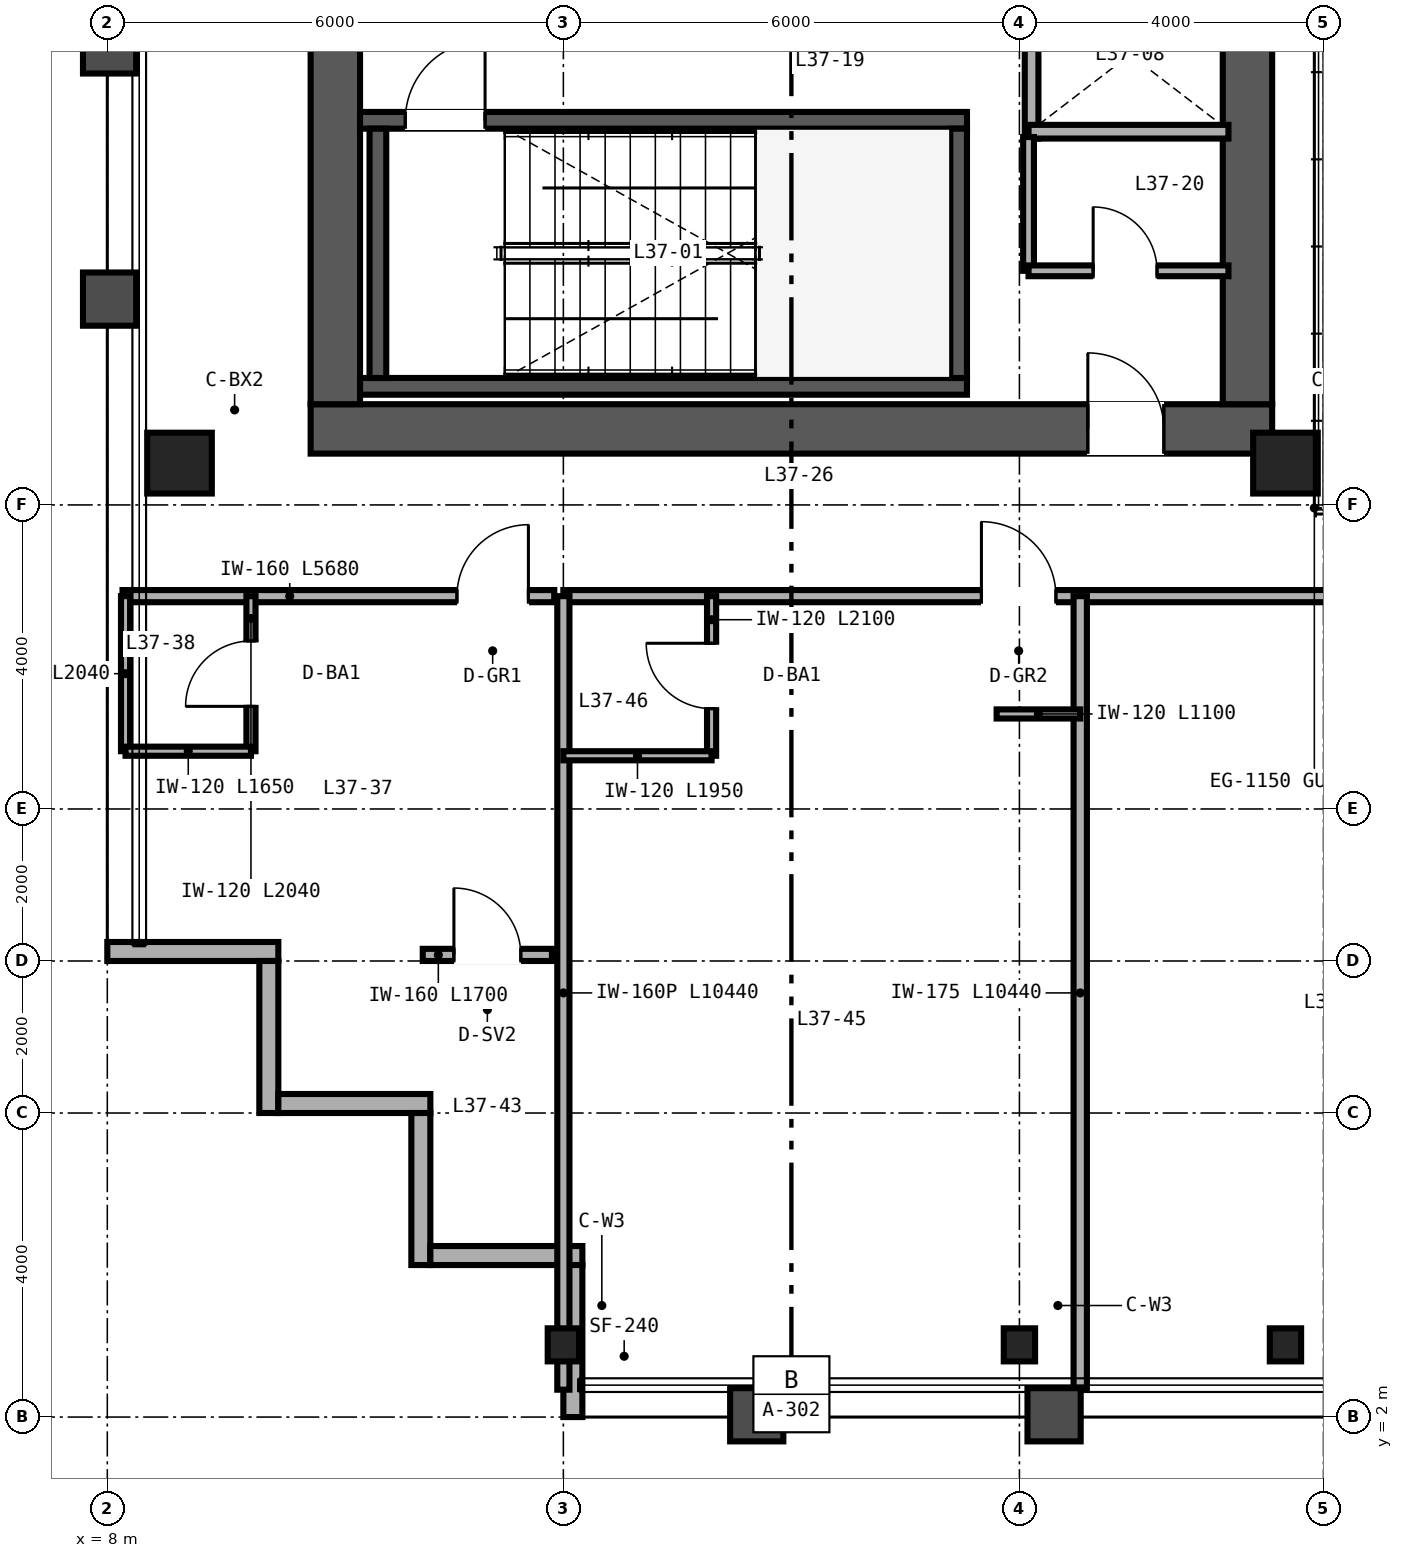
"""IFC4 building model, lengths in metres.
Left out: names, types, materials, properties, quantities, classifications, styles, units other than length and angle.
Written with IfcOpenShell. Run it as: python <this file> out.ifc"""

import sys

from ifc_helpers import new_model, si_unit, direction, frame, frame_2d, origin, origin_2d, place, context, subcontext, project, spatial, rectangle, hollow_rectangle, i_section, extrude, source, transform, mapped, element, fill, save


model = new_model("IFC4")
c1 = context("Model", 3, precision=1e-05, world=origin(), true_north=direction((0.0, 1.0)))
c2 = subcontext(c1, "Body", "Model", "MODEL_VIEW")
j1 = project(units=[si_unit("LENGTHUNIT", "METRE"), si_unit("PLANEANGLEUNIT", "RADIAN")], contexts=[c1])
p1 = place(None, origin())
s1 = spatial("IfcSite", under=j1, at=p1, CompositionType="ELEMENT")
p2 = place(p1, origin())
s2 = spatial("IfcBuilding", under=s1, at=p2, CompositionType="ELEMENT")
p3 = place(p2, frame((0.0, 0.0, 147.6)))
s3 = spatial("IfcBuildingStorey", under=s2, at=p3, CompositionType="ELEMENT", Elevation=147.6)
p4 = place(p3, frame((10.675, 15.0, 0.0), z_axis=(0.0, 0.0, 1.0), x_axis=(1.0, 0.0, 0.0)))
e1 = element("IfcWall", 1, at=p4, inside=s3, PredefinedType="SHEAR", context=c2, shape_type="SweptSolid", body=[
    extrude(rectangle(XDim=12.65, YDim=0.65, at=frame_2d((6.325, 0.0))), origin(), (0.0, 0.0, 1.0), 3.28),
])
p5 = place(p4, frame((10.225, 0.0, 0.0)))
e2 = element("IfcOpeningElement", 2, at=p5, cuts=e1, PredefinedType="OPENING", context=c2, shape_type="SweptSolid", body=[
    extrude(rectangle(XDim=1.0, YDim=2.15, at=frame_2d((0.5, 1.075))), frame((0.0, 0.335, 0.0), z_axis=(0.0, -1.0, 0.0), x_axis=(1.0, 0.0, 0.0)), (0.0, 0.0, 1.0), 0.67),
])
for number, where, z_axis, x_axis in (
    (3, (11.0, 15.325, 0.0), (0.0, 0.0, 1.0), (0.0, 1.0, 0.0)),
    (4, (23.0, 15.325, 0.0), (0.0, 0.0, 1.0), (0.0, 1.0, 0.0)),
):
    element("IfcWall", number, at=place(p3, frame(where, z_axis=z_axis, x_axis=x_axis)), inside=s3, PredefinedType="SHEAR", context=c2, shape_type="SweptSolid", body=[
        extrude(rectangle(XDim=21.35, YDim=0.65, at=frame_2d((10.675, 0.0))), origin(), (0.0, 0.0, 1.0), 3.28),
    ])
p6 = place(p3, frame((11.325, 15.56, 0.0), z_axis=(0.0, 0.0, 1.0), x_axis=(1.0, 0.0, 0.0)))
e5 = element("IfcWall", 5, at=p6, inside=s3, PredefinedType="SHEAR", context=c2, shape_type="SweptSolid", body=[
    extrude(rectangle(XDim=7.985, YDim=0.22, at=frame_2d((3.993, 0.0))), origin(), (0.0, 0.0, 1.0), 3.4),
])
p7 = place(p3, frame((11.325, 19.06, 0.0), z_axis=(0.0, 0.0, 1.0), x_axis=(1.0, 0.0, 0.0)))
e6 = element("IfcWall", 6, at=p7, inside=s3, PredefinedType="SHEAR", context=c2, shape_type="SweptSolid", body=[
    extrude(rectangle(XDim=7.985, YDim=0.22, at=frame_2d((3.993, 0.0))), origin(), (0.0, 0.0, 1.0), 3.4),
])
p8 = place(p7, frame((0.595, 0.0, 0.0)))
e7 = element("IfcOpeningElement", 7, at=p8, cuts=e6, PredefinedType="OPENING", context=c2, shape_type="SweptSolid", body=[
    extrude(rectangle(XDim=1.05, YDim=2.15, at=frame_2d((0.525, 1.075))), frame((0.0, 0.12, 0.0), z_axis=(0.0, -1.0, 0.0), x_axis=(1.0, 0.0, 0.0)), (0.0, 0.0, 1.0), 0.24),
])
for number, where, z_axis, x_axis in (
    (8, (11.56, 15.67, 0.0), (0.0, 0.0, 1.0), (0.0, 1.0, 0.0)),
    (9, (19.2, 15.67, 0.0), (0.0, 0.0, 1.0), (0.0, 1.0, 0.0)),
):
    element("IfcWall", number, at=place(p3, frame(where, z_axis=z_axis, x_axis=x_axis)), inside=s3, PredefinedType="SHEAR", context=c2, shape_type="SweptSolid", body=[
        extrude(rectangle(XDim=3.28, YDim=0.22, at=frame_2d((1.64, 0.0))), origin(), (0.0, 0.0, 1.0), 3.4),
    ])
m1 = source(origin(), c2, "Body", "SweptSolid", [
    extrude(hollow_rectangle(XDim=0.85, YDim=0.8, WallThickness=0.032, at=origin_2d()), origin(), (0.0, 0.0, 1.0), 3.28),
])
for number, where, z_axis, x_axis in (
    (10, (8.95, 14.55, 0.0), (0.0, 0.0, 1.0), (1.0, 0.0, 0.0)),
    (11, (23.5, 14.55, 0.0), (0.0, 0.0, 1.0), (1.0, 0.0, 0.0)),
):
    element("IfcColumn", number, at=place(p3, frame(where, z_axis=z_axis, x_axis=x_axis)), inside=s3, PredefinedType="COLUMN", context=c2, shape_type="MappedRepresentation", body=[
        mapped(m1, transform((0.0, 0.0, 0.0), scale=1.0)),
    ])
m2 = source(origin(), c2, "Body", "SweptSolid", [
    extrude(i_section(OverallWidth=0.412, OverallDepth=0.435, WebThickness=0.036, FlangeThickness=0.057, FilletRadius=0.025, at=origin_2d()), origin(), (0.0, 0.0, 1.0), 3.28),
])
for number, where, z_axis, x_axis in (
    (12, (14.0, 2.95, 0.0), (0.0, 0.0, 1.0), (1.0, 0.0, 0.0)),
    (13, (20.0, 2.95, 0.0), (0.0, 0.0, 1.0), (1.0, 0.0, 0.0)),
    (14, (23.5, 2.95, 0.0), (0.0, 0.0, 1.0), (1.0, 0.0, 0.0)),
):
    element("IfcColumn", number, at=place(p3, frame(where, z_axis=z_axis, x_axis=x_axis)), inside=s3, PredefinedType="COLUMN", context=c2, shape_type="MappedRepresentation", body=[
        mapped(m2, transform((0.0, 0.0, 0.0), scale=1.0)),
    ])
p9 = place(p3, frame((8.0, 8.125, 0.0), z_axis=(0.0, 0.0, 1.0), x_axis=(1.0, 0.0, 0.0)))
e15 = element("IfcWall", 15, at=p9, inside=s3, PredefinedType="SOLIDWALL", context=c2, shape_type="SweptSolid", body=[
    extrude(rectangle(XDim=2.25, YDim=0.25, at=frame_2d((1.125, 0.0))), origin(), (0.0, 0.0, 1.0), 3.28),
])
for number, where, z_axis, x_axis in (
    (16, (10.125, 8.0, 0.0), (0.0, 0.0, 1.0), (0.0, -1.0, 0.0)),
    (17, (10.25, 6.125, 0.0), (0.0, 0.0, 1.0), (1.0, 0.0, 0.0)),
    (18, (12.125, 6.0, 0.0), (0.0, 0.0, 1.0), (0.0, -1.0, 0.0)),
    (19, (12.25, 4.125, 0.0), (0.0, 0.0, 1.0), (1.0, 0.0, 0.0)),
):
    element("IfcWall", number, at=place(p3, frame(where, z_axis=z_axis, x_axis=x_axis)), inside=s3, PredefinedType="SOLIDWALL", context=c2, shape_type="SweptSolid", body=[
        extrude(rectangle(XDim=2.0, YDim=0.25, at=frame_2d((1.0, 0.0))), origin(), (0.0, 0.0, 1.0), 3.28),
    ])
p10 = place(p3, frame((14.125, 4.0, 0.0), z_axis=(0.0, 0.0, 1.0), x_axis=(0.0, -1.0, 0.0)))
e20 = element("IfcWall", 20, at=p10, inside=s3, PredefinedType="SOLIDWALL", context=c2, shape_type="SweptSolid", body=[
    extrude(rectangle(XDim=2.0, YDim=0.25, at=frame_2d((1.0, 0.0))), origin(), (0.0, 0.0, 1.0), 2.587),
])
p11 = place(p3, frame((20.16, 18.82, 0.0), z_axis=(0.0, 0.0, 1.0), x_axis=(0.0, 1.0, 0.0)))
e21 = element("IfcWall", 21, at=p11, inside=s3, PredefinedType="SOLIDWALL", context=c2, shape_type="SweptSolid", body=[
    extrude(rectangle(XDim=6.32, YDim=0.18, at=frame_2d((3.16, 0.0))), origin(), (0.0, 0.0, 1.0), 2.36),
])
p12 = place(p3, frame((20.12, 18.91, 0.0), z_axis=(0.0, 0.0, 1.0), x_axis=(1.0, 0.0, 0.0)))
e22 = element("IfcWall", 22, at=p12, inside=s3, PredefinedType="SOLIDWALL", context=c2, shape_type="SweptSolid", body=[
    extrude(rectangle(XDim=2.63, YDim=0.18, at=frame_2d((1.315, 0.0))), origin(), (0.0, 0.0, 1.0), 3.28),
])
p13 = place(p3, frame((20.12, 17.08, 0.0), z_axis=(0.0, 0.0, 1.0), x_axis=(0.0, 1.0, 0.0)))
e23 = element("IfcWall", 23, at=p13, inside=s3, PredefinedType="PARTITIONING", context=c2, shape_type="SweptSolid", body=[
    extrude(rectangle(XDim=1.76, YDim=0.142, at=frame_2d((0.88, 0.0))), origin(), (0.0, 0.0, 1.0), 3.28),
])
p14 = place(p3, frame((20.12, 17.08, 0.0), z_axis=(0.0, 0.0, 1.0), x_axis=(1.0, 0.0, 0.0)))
e24 = element("IfcWall", 24, at=p14, inside=s3, PredefinedType="PARTITIONING", context=c2, shape_type="SweptSolid", body=[
    extrude(rectangle(XDim=2.63, YDim=0.142, at=frame_2d((1.315, 0.0))), origin(), (0.0, 0.0, 1.0), 3.28),
])
p15 = place(p14, frame((0.85, 0.0, 0.0)))
e25 = element("IfcOpeningElement", 25, at=p15, cuts=e24, PredefinedType="OPENING", context=c2, shape_type="SweptSolid", body=[
    extrude(rectangle(XDim=0.84, YDim=2.1, at=frame_2d((0.42, 1.05))), frame((0.0, 0.081, 0.0), z_axis=(0.0, -1.0, 0.0), x_axis=(1.0, 0.0, 0.0)), (0.0, 0.0, 1.0), 0.162),
])
p16 = place(p3, frame((8.2, 12.8, 0.0), z_axis=(0.0, 0.0, 1.0), x_axis=(1.0, 0.0, 0.0)))
e26 = element("IfcWall", 26, at=p16, inside=s3, PredefinedType="PARTITIONING", context=c2, shape_type="SweptSolid", body=[
    extrude(rectangle(XDim=5.68, YDim=0.16, at=frame_2d((2.84, 0.0))), origin(), (0.0, 0.0, 1.0), 3.28),
])
p17 = place(p16, frame((4.4, 0.0, 0.0)))
e27 = element("IfcOpeningElement", 27, at=p17, cuts=e26, PredefinedType="OPENING", context=c2, shape_type="SweptSolid", body=[
    extrude(rectangle(XDim=0.94, YDim=2.15, at=frame_2d((0.47, 1.075))), frame((0.0, 0.09, 0.0), z_axis=(0.0, -1.0, 0.0), x_axis=(1.0, 0.0, 0.0)), (0.0, 0.0, 1.0), 0.18),
])
p18 = place(p3, frame((9.89, 10.76, 0.0), z_axis=(0.0, 0.0, 1.0), x_axis=(0.0, 1.0, 0.0)))
e28 = element("IfcWall", 28, at=p18, inside=s3, PredefinedType="PARTITIONING", context=c2, shape_type="SweptSolid", body=[
    extrude(rectangle(XDim=2.04, YDim=0.12, at=frame_2d((1.02, 0.0))), origin(), (0.0, 0.0, 1.0), 3.28),
])
p19 = place(p18, frame((0.59, 0.0, 0.0)))
e29 = element("IfcOpeningElement", 29, at=p19, cuts=e28, PredefinedType="OPENING", context=c2, shape_type="SweptSolid", body=[
    extrude(rectangle(XDim=0.86, YDim=2.1, at=frame_2d((0.43, 1.05))), frame((0.0, 0.07, 0.0), z_axis=(0.0, -1.0, 0.0), x_axis=(1.0, 0.0, 0.0)), (0.0, 0.0, 1.0), 0.14),
])
p20 = place(p3, frame((8.24, 10.76, 0.0), z_axis=(0.0, 0.0, 1.0), x_axis=(0.0, 1.0, 0.0)))
e30 = element("IfcWall", 30, at=p20, inside=s3, PredefinedType="PARTITIONING", context=c2, shape_type="SweptSolid", body=[
    extrude(rectangle(XDim=2.04, YDim=0.12, at=frame_2d((1.02, 0.0))), origin(), (0.0, 0.0, 1.0), 3.28),
])
p21 = place(p3, frame((8.24, 10.76, 0.0), z_axis=(0.0, 0.0, 1.0), x_axis=(1.0, 0.0, 0.0)))
e31 = element("IfcWall", 31, at=p21, inside=s3, PredefinedType="PARTITIONING", context=c2, shape_type="SweptSolid", body=[
    extrude(rectangle(XDim=1.65, YDim=0.12, at=frame_2d((0.825, 0.0))), origin(), (0.0, 0.0, 1.0), 3.28),
])
p22 = place(p3, frame((12.15, 8.08, 0.0), z_axis=(0.0, 0.0, 1.0), x_axis=(1.0, 0.0, 0.0)))
e32 = element("IfcWall", 32, at=p22, inside=s3, PredefinedType="PARTITIONING", context=c2, shape_type="SweptSolid", body=[
    extrude(rectangle(XDim=1.7, YDim=0.16, at=frame_2d((0.85, 0.0))), origin(), (0.0, 0.0, 1.0), 3.28),
])
p23 = place(p22, frame((0.41, 0.0, 0.0)))
e33 = element("IfcOpeningElement", 33, at=p23, cuts=e32, PredefinedType="OPENING", context=c2, shape_type="SweptSolid", body=[
    extrude(rectangle(XDim=0.88, YDim=2.15, at=frame_2d((0.44, 1.075))), frame((0.0, 0.09, 0.0), z_axis=(0.0, -1.0, 0.0), x_axis=(1.0, 0.0, 0.0)), (0.0, 0.0, 1.0), 0.18),
])
p24 = place(p3, frame((14.0, 12.8, 0.0), z_axis=(0.0, 0.0, 1.0), x_axis=(1.0, 0.0, 0.0)))
e34 = element("IfcWall", 34, at=p24, inside=s3, PredefinedType="PARTITIONING", context=c2, shape_type="SweptSolid", body=[
    extrude(rectangle(XDim=36.0, YDim=0.16, at=frame_2d((18.0, 0.0))), origin(), (0.0, 0.0, 1.0), 2.501),
])
p25 = place(p24, frame((5.5, 0.0, 0.0)))
e35 = element("IfcOpeningElement", 35, at=p25, cuts=e34, PredefinedType="OPENING", context=c2, shape_type="SweptSolid", body=[
    extrude(rectangle(XDim=0.98, YDim=2.2, at=frame_2d((0.49, 1.1))), frame((0.0, 0.09, 0.0), z_axis=(0.0, -1.0, 0.0), x_axis=(1.0, 0.0, 0.0)), (0.0, 0.0, 1.0), 0.18),
])
p26 = place(p24, frame((10.2, 0.0, 0.0)))
e36 = element("IfcOpeningElement", 36, at=p26, cuts=e34, PredefinedType="OPENING", context=c2, shape_type="SweptSolid", body=[
    extrude(rectangle(XDim=0.96, YDim=2.15, at=frame_2d((0.48, 1.075))), frame((0.0, 0.09, 0.0), z_axis=(0.0, -1.0, 0.0), x_axis=(1.0, 0.0, 0.0)), (0.0, 0.0, 1.0), 0.18),
])
p27 = place(p24, frame((16.72, 0.0, 0.0)))
e37 = element("IfcOpeningElement", 37, at=p27, cuts=e34, PredefinedType="OPENING", context=c2, shape_type="SweptSolid", body=[
    extrude(rectangle(XDim=0.96, YDim=2.15, at=frame_2d((0.48, 1.075))), frame((0.0, 0.09, 0.0), z_axis=(0.0, -1.0, 0.0), x_axis=(1.0, 0.0, 0.0)), (0.0, 0.0, 1.0), 0.18),
])
p28 = place(p24, frame((27.14, 0.0, 0.0)))
e38 = element("IfcOpeningElement", 38, at=p28, cuts=e34, PredefinedType="OPENING", context=c2, shape_type="SweptSolid", body=[
    extrude(rectangle(XDim=0.94, YDim=2.15, at=frame_2d((0.47, 1.075))), frame((0.0, 0.09, 0.0), z_axis=(0.0, -1.0, 0.0), x_axis=(1.0, 0.0, 0.0)), (0.0, 0.0, 1.0), 0.18),
])
p29 = place(p24, frame((34.74, 0.0, 0.0)))
e39 = element("IfcOpeningElement", 39, at=p29, cuts=e34, PredefinedType="OPENING", context=c2, shape_type="SweptSolid", body=[
    extrude(rectangle(XDim=0.94, YDim=2.15, at=frame_2d((0.47, 1.075))), frame((0.0, 0.09, 0.0), z_axis=(0.0, -1.0, 0.0), x_axis=(1.0, 0.0, 0.0)), (0.0, 0.0, 1.0), 0.18),
])
p30 = place(p3, frame((14.0, 2.36, 0.0), z_axis=(0.0, 0.0, 1.0), x_axis=(0.0, 1.0, 0.0)))
e40 = element("IfcWall", 40, at=p30, inside=s3, PredefinedType="PARTITIONING", context=c2, shape_type="SweptSolid", body=[
    extrude(rectangle(XDim=10.44, YDim=0.16, at=frame_2d((5.22, 0.0))), origin(), (0.0, 0.0, 1.0), 2.587),
])
p31 = place(p3, frame((20.8, 2.36, 0.0), z_axis=(0.0, 0.0, 1.0), x_axis=(0.0, 1.0, 0.0)))
e41 = element("IfcWall", 41, at=p31, inside=s3, PredefinedType="PARTITIONING", context=c2, shape_type="SweptSolid", body=[
    extrude(rectangle(XDim=10.44, YDim=0.175, at=frame_2d((5.22, 0.0))), origin(), (0.0, 0.0, 1.0), 2.743),
])
p32 = place(p3, frame((15.95, 10.7, 0.0), z_axis=(0.0, 0.0, 1.0), x_axis=(0.0, 1.0, 0.0)))
e42 = element("IfcWall", 42, at=p32, inside=s3, PredefinedType="PARTITIONING", context=c2, shape_type="SweptSolid", body=[
    extrude(rectangle(XDim=2.1, YDim=0.12, at=frame_2d((1.05, 0.0))), origin(), (0.0, 0.0, 1.0), 3.28),
])
p33 = place(p32, frame((0.62, 0.0, 0.0)))
e43 = element("IfcOpeningElement", 43, at=p33, cuts=e42, PredefinedType="OPENING", context=c2, shape_type="SweptSolid", body=[
    extrude(rectangle(XDim=0.86, YDim=2.1, at=frame_2d((0.43, 1.05))), frame((0.0, 0.07, 0.0), z_axis=(0.0, -1.0, 0.0), x_axis=(1.0, 0.0, 0.0)), (0.0, 0.0, 1.0), 0.14),
])
p34 = place(p3, frame((14.0, 10.7, 0.0), z_axis=(0.0, 0.0, 1.0), x_axis=(1.0, 0.0, 0.0)))
e44 = element("IfcWall", 44, at=p34, inside=s3, PredefinedType="PARTITIONING", context=c2, shape_type="SweptSolid", body=[
    extrude(rectangle(XDim=1.95, YDim=0.12, at=frame_2d((0.975, 0.0))), origin(), (0.0, 0.0, 1.0), 3.28),
])
p35 = place(p3, frame((19.7, 11.25, 0.0), z_axis=(0.0, 0.0, 1.0), x_axis=(1.0, 0.0, 0.0)))
e45 = element("IfcWall", 45, at=p35, inside=s3, PredefinedType="PARTITIONING", context=c2, shape_type="SweptSolid", body=[
    extrude(rectangle(XDim=1.1, YDim=0.12, at=frame_2d((0.55, 0.0))), origin(), (0.0, 0.0, 1.0), 3.28),
])
m3 = source(origin(), c2, "Body", "SweptSolid", [
    extrude(rectangle(XDim=1.05, YDim=2.15, at=frame_2d((0.525, 1.075))), frame((0.0, 0.025, 0.0), z_axis=(0.0, -1.0, 0.0), x_axis=(1.0, 0.0, 0.0)), (0.0, 0.0, 1.0), 0.05),
])
p36 = place(p8, origin())
e46 = element("IfcDoor", 46, at=p36, inside=s3, OperationType="SINGLE_SWING_RIGHT", PredefinedType="DOOR", context=c2, shape_type="MappedRepresentation", body=[
    mapped(m3, transform((0.0, 0.0, 0.0), scale=1.0)),
])
fill(e7, e46)
m4 = source(origin(), c2, "Body", "SweptSolid", [
    extrude(rectangle(XDim=0.84, YDim=2.1, at=frame_2d((0.42, 1.05))), frame((0.0, 0.025, 0.0), z_axis=(0.0, -1.0, 0.0), x_axis=(1.0, 0.0, 0.0)), (0.0, 0.0, 1.0), 0.05),
])
p37 = place(p15, origin())
e47 = element("IfcDoor", 47, at=p37, inside=s3, OperationType="SINGLE_SWING_LEFT", PredefinedType="DOOR", context=c2, shape_type="MappedRepresentation", body=[
    mapped(m4, transform((0.0, 0.0, 0.0), scale=1.0)),
])
fill(e25, e47)
m5 = source(origin(), c2, "Body", "SweptSolid", [
    extrude(rectangle(XDim=1.0, YDim=2.15, at=frame_2d((0.5, 1.075))), frame((0.0, 0.025, 0.0), z_axis=(0.0, -1.0, 0.0), x_axis=(1.0, 0.0, 0.0)), (0.0, 0.0, 1.0), 0.05),
])
p38 = place(p5, origin())
e48 = element("IfcDoor", 48, at=p38, inside=s3, OperationType="SINGLE_SWING_LEFT", PredefinedType="DOOR", context=c2, shape_type="MappedRepresentation", body=[
    mapped(m5, transform((0.0, 0.0, 0.0), scale=1.0)),
])
fill(e2, e48)
m6 = source(origin(), c2, "Body", "SweptSolid", [
    extrude(rectangle(XDim=0.86, YDim=2.1, at=frame_2d((0.43, 1.05))), frame((0.0, 0.025, 0.0), z_axis=(0.0, -1.0, 0.0), x_axis=(1.0, 0.0, 0.0)), (0.0, 0.0, 1.0), 0.05),
])
p39 = place(p19, origin())
e49 = element("IfcDoor", 49, at=p39, inside=s3, OperationType="SINGLE_SWING_LEFT", PredefinedType="DOOR", context=c2, shape_type="MappedRepresentation", body=[
    mapped(m6, transform((0.0, 0.0, 0.0), scale=1.0)),
])
fill(e29, e49)
m7 = source(origin(), c2, "Body", "SweptSolid", [
    extrude(rectangle(XDim=0.94, YDim=2.15, at=frame_2d((0.47, 1.075))), frame((0.0, 0.025, 0.0), z_axis=(0.0, -1.0, 0.0), x_axis=(1.0, 0.0, 0.0)), (0.0, 0.0, 1.0), 0.05),
])
p40 = place(p17, origin())
e50 = element("IfcDoor", 50, at=p40, inside=s3, OperationType="SINGLE_SWING_RIGHT", PredefinedType="DOOR", context=c2, shape_type="MappedRepresentation", body=[
    mapped(m7, transform((0.0, 0.0, 0.0), scale=1.0)),
])
fill(e27, e50)
m8 = source(origin(), c2, "Body", "SweptSolid", [
    extrude(rectangle(XDim=0.88, YDim=2.15, at=frame_2d((0.44, 1.075))), frame((0.0, 0.025, 0.0), z_axis=(0.0, -1.0, 0.0), x_axis=(1.0, 0.0, 0.0)), (0.0, 0.0, 1.0), 0.05),
])
p41 = place(p23, origin())
e51 = element("IfcDoor", 51, at=p41, inside=s3, OperationType="SINGLE_SWING_LEFT", PredefinedType="DOOR", context=c2, shape_type="MappedRepresentation", body=[
    mapped(m8, transform((0.0, 0.0, 0.0), scale=1.0)),
])
fill(e33, e51)
p42 = place(p33, origin())
e52 = element("IfcDoor", 52, at=p42, inside=s3, OperationType="SINGLE_SWING_RIGHT", PredefinedType="DOOR", context=c2, shape_type="MappedRepresentation", body=[
    mapped(m6, transform((0.0, 0.0, 0.0), scale=1.0)),
])
fill(e43, e52)
m9 = source(origin(), c2, "Body", "SweptSolid", [
    extrude(rectangle(XDim=0.98, YDim=2.2, at=frame_2d((0.49, 1.1))), frame((0.0, 0.025, 0.0), z_axis=(0.0, -1.0, 0.0), x_axis=(1.0, 0.0, 0.0)), (0.0, 0.0, 1.0), 0.05),
])
p43 = place(p25, origin())
e53 = element("IfcDoor", 53, at=p43, inside=s3, OperationType="SINGLE_SWING_LEFT", PredefinedType="DOOR", context=c2, shape_type="MappedRepresentation", body=[
    mapped(m9, transform((0.0, 0.0, 0.0), scale=1.0)),
])
fill(e35, e53)
save(model, sys.argv[1])
